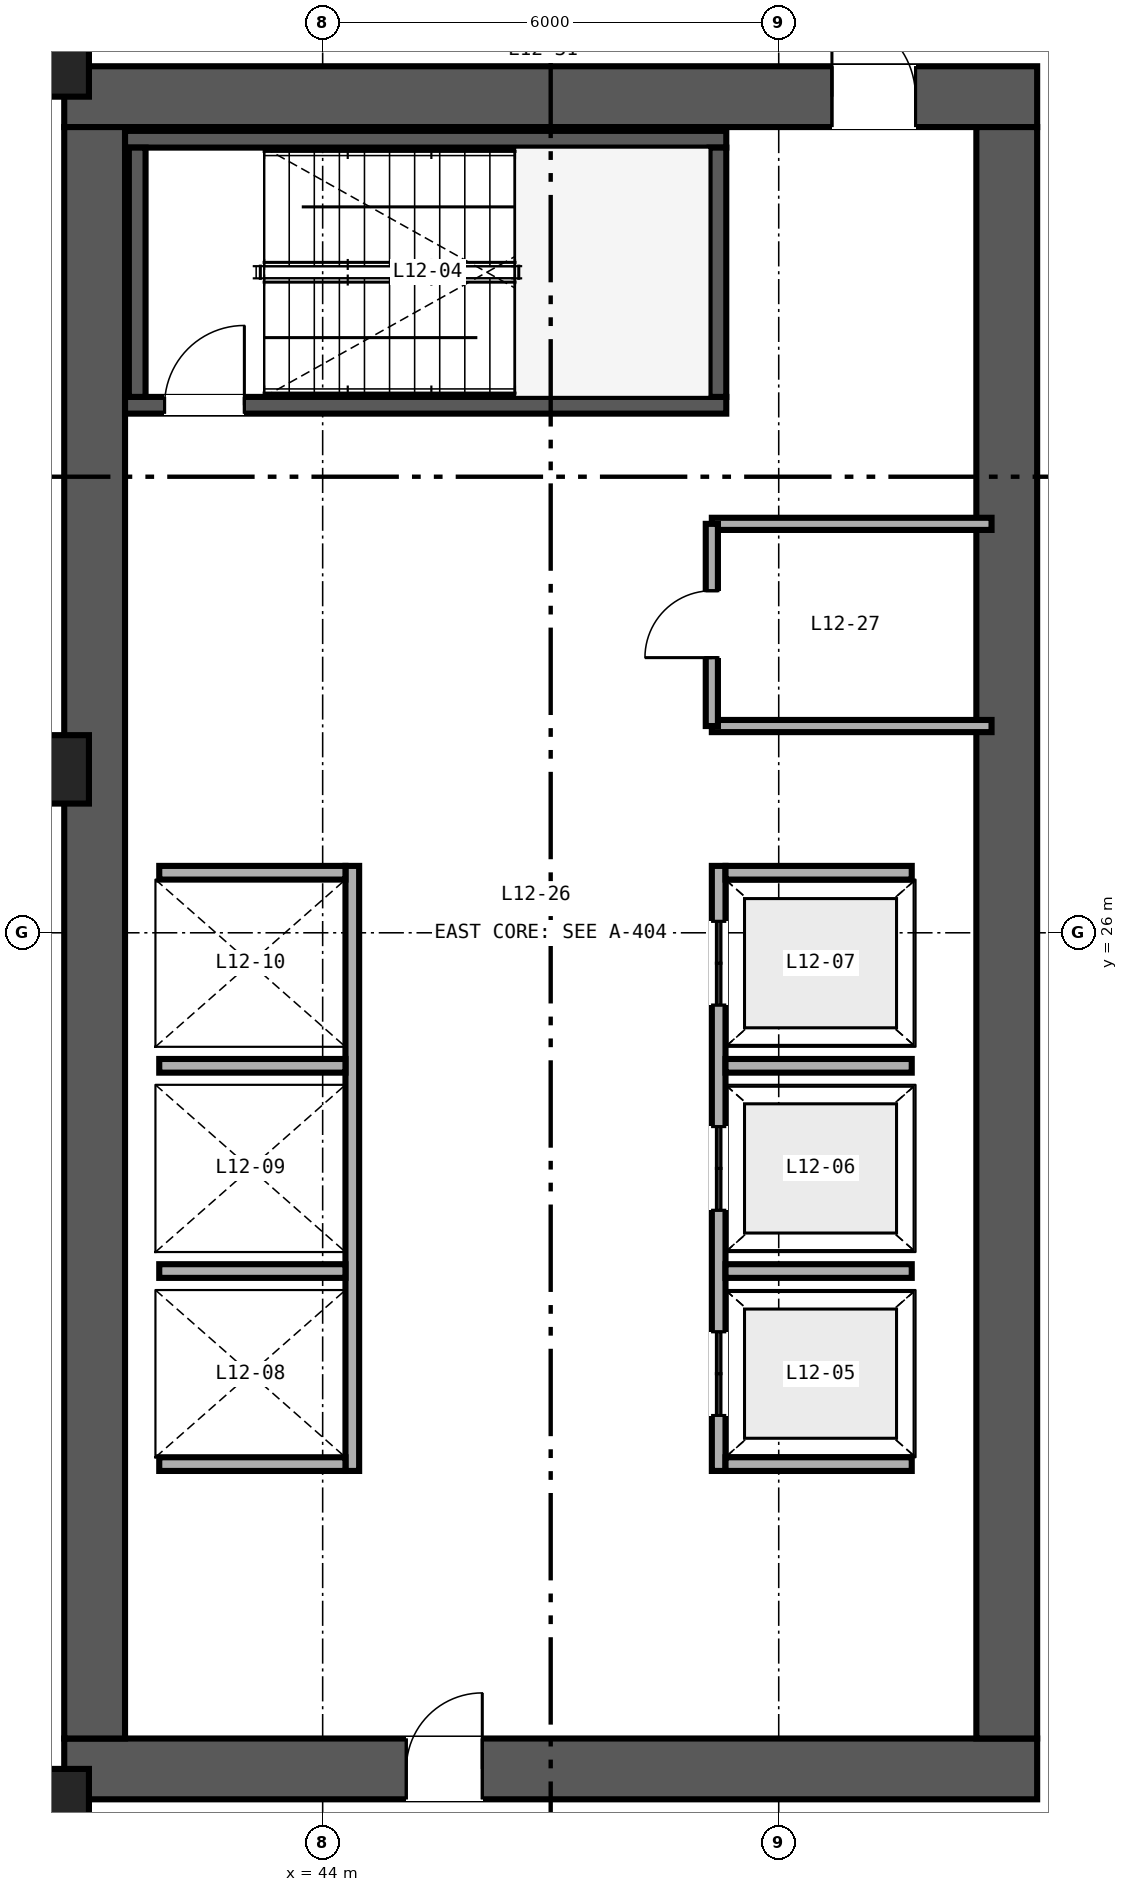
"""IFC4 building model, lengths in metres.
Left out: names, types, materials, properties, quantities, classifications, styles, units other than length and angle.
Written with IfcOpenShell. Run it as: python <this file> out.ifc"""

import sys

from ifc_helpers import new_model, si_unit, direction, frame, frame_2d, origin, origin_2d, place, context, subcontext, project, spatial, rectangle, hollow_rectangle, extrude, source, transform, mapped, element, fill, save


model = new_model("IFC4")
c1 = context("Model", 3, precision=1e-05, world=origin(), true_north=direction((0.0, 1.0)))
c2 = subcontext(c1, "Body", "Model", "MODEL_VIEW")
j1 = project(units=[si_unit("LENGTHUNIT", "METRE"), si_unit("PLANEANGLEUNIT", "RADIAN")], contexts=[c1])
p1 = place(None, origin())
s1 = spatial("IfcSite", under=j1, at=p1, CompositionType="ELEMENT")
p2 = place(p1, origin())
s2 = spatial("IfcBuilding", under=s1, at=p2, CompositionType="ELEMENT")
p3 = place(p2, frame((0.0, 0.0, 52.8)))
s3 = spatial("IfcBuildingStorey", under=s2, at=p3, CompositionType="ELEMENT", Elevation=52.8)
p4 = place(p3, frame((40.6, 15.0, 0.0), z_axis=(0.0, 0.0, 1.0), x_axis=(1.0, 0.0, 0.0)))
e1 = element("IfcWall", 1, at=p4, inside=s3, PredefinedType="SHEAR", context=c2, shape_type="SweptSolid", body=[
    extrude(rectangle(XDim=12.8, YDim=0.8, at=frame_2d((6.4, 0.0))), origin(), (0.0, 0.0, 1.0), 3.35),
])
p5 = place(p4, frame((4.5, 0.0, 0.0)))
e2 = element("IfcOpeningElement", 2, at=p5, cuts=e1, PredefinedType="OPENING", context=c2, shape_type="SweptSolid", body=[
    extrude(rectangle(XDim=1.0, YDim=2.15, at=frame_2d((0.5, 1.075))), frame((0.0, 0.41, 0.0), z_axis=(0.0, -1.0, 0.0), x_axis=(1.0, 0.0, 0.0)), (0.0, 0.0, 1.0), 0.82),
])
p6 = place(p3, frame((40.6, 37.0, 0.0), z_axis=(0.0, 0.0, 1.0), x_axis=(1.0, 0.0, 0.0)))
e3 = element("IfcWall", 3, at=p6, inside=s3, PredefinedType="SHEAR", context=c2, shape_type="SweptSolid", body=[
    extrude(rectangle(XDim=12.8, YDim=0.8, at=frame_2d((6.4, 0.0))), origin(), (0.0, 0.0, 1.0), 3.35),
])
p7 = place(p6, frame((10.1, 0.0, 0.0)))
e4 = element("IfcOpeningElement", 4, at=p7, cuts=e3, PredefinedType="OPENING", context=c2, shape_type="SweptSolid", body=[
    extrude(rectangle(XDim=1.1, YDim=2.15, at=frame_2d((0.55, 1.075))), frame((0.0, 0.41, 0.0), z_axis=(0.0, -1.0, 0.0), x_axis=(1.0, 0.0, 0.0)), (0.0, 0.0, 1.0), 0.82),
])
for number, where, z_axis, x_axis in (
    (5, (41.0, 15.4, 0.0), (0.0, 0.0, 1.0), (0.0, 1.0, 0.0)),
    (6, (53.0, 15.4, 0.0), (0.0, 0.0, 1.0), (0.0, 1.0, 0.0)),
):
    element("IfcWall", number, at=place(p3, frame(where, z_axis=z_axis, x_axis=x_axis)), inside=s3, PredefinedType="SHEAR", context=c2, shape_type="SweptSolid", body=[
        extrude(rectangle(XDim=21.2, YDim=0.8, at=frame_2d((10.6, 0.0))), origin(), (0.0, 0.0, 1.0), 3.35),
    ])
p8 = place(p3, frame((41.4, 32.94, 0.0), z_axis=(0.0, 0.0, 1.0), x_axis=(1.0, 0.0, 0.0)))
e7 = element("IfcWall", 7, at=p8, inside=s3, PredefinedType="SHEAR", context=c2, shape_type="SweptSolid", body=[
    extrude(rectangle(XDim=7.91, YDim=0.22, at=frame_2d((3.955, 0.0))), origin(), (0.0, 0.0, 1.0), 3.4),
])
p9 = place(p8, frame((0.52, 0.0, 0.0)))
e8 = element("IfcOpeningElement", 8, at=p9, cuts=e7, PredefinedType="OPENING", context=c2, shape_type="SweptSolid", body=[
    extrude(rectangle(XDim=1.05, YDim=2.15, at=frame_2d((0.525, 1.075))), frame((0.0, 0.12, 0.0), z_axis=(0.0, -1.0, 0.0), x_axis=(1.0, 0.0, 0.0)), (0.0, 0.0, 1.0), 0.24),
])
p10 = place(p3, frame((41.4, 36.44, 0.0), z_axis=(0.0, 0.0, 1.0), x_axis=(1.0, 0.0, 0.0)))
e9 = element("IfcWall", 9, at=p10, inside=s3, PredefinedType="SHEAR", context=c2, shape_type="SweptSolid", body=[
    extrude(rectangle(XDim=7.91, YDim=0.22, at=frame_2d((3.955, 0.0))), origin(), (0.0, 0.0, 1.0), 3.4),
])
for number, where, z_axis, x_axis in (
    (10, (41.56, 33.05, 0.0), (0.0, 0.0, 1.0), (0.0, 1.0, 0.0)),
    (11, (49.2, 33.05, 0.0), (0.0, 0.0, 1.0), (0.0, 1.0, 0.0)),
):
    element("IfcWall", number, at=place(p3, frame(where, z_axis=z_axis, x_axis=x_axis)), inside=s3, PredefinedType="SHEAR", context=c2, shape_type="SweptSolid", body=[
        extrude(rectangle(XDim=3.28, YDim=0.22, at=frame_2d((1.64, 0.0))), origin(), (0.0, 0.0, 1.0), 3.4),
    ])
m1 = source(origin(), c2, "Body", "SweptSolid", [
    extrude(hollow_rectangle(XDim=0.85, YDim=0.9, WallThickness=0.04, at=origin_2d()), origin(), (0.0, 0.0, 1.0), 3.35),
])
for number, where, z_axis, x_axis in (
    (12, (40.5, 14.55, 0.0), (0.0, 0.0, 1.0), (1.0, 0.0, 0.0)),
    (13, (40.5, 28.15, 0.0), (0.0, 0.0, 1.0), (1.0, 0.0, 0.0)),
    (14, (40.5, 37.45, 0.0), (0.0, 0.0, 1.0), (1.0, 0.0, 0.0)),
):
    element("IfcColumn", number, at=place(p3, frame(where, z_axis=z_axis, x_axis=x_axis)), inside=s3, PredefinedType="COLUMN", context=c2, shape_type="MappedRepresentation", body=[
        mapped(m1, transform((0.0, 0.0, 0.0), scale=1.0)),
    ])
p11 = place(p3, frame((49.21, 18.92, 0.0), z_axis=(0.0, 0.0, 1.0), x_axis=(0.0, 1.0, 0.0)))
e15 = element("IfcWall", 15, at=p11, inside=s3, PredefinedType="SOLIDWALL", context=c2, shape_type="SweptSolid", body=[
    extrude(rectangle(XDim=7.96, YDim=0.18, at=frame_2d((3.98, 0.0))), origin(), (0.0, 0.0, 1.0), 3.35),
])
p12 = place(p11, frame((0.73, 0.0, 0.0)))
e16 = element("IfcOpeningElement", 16, at=p12, cuts=e15, PredefinedType="OPENING", context=c2, shape_type="SweptSolid", body=[
    extrude(rectangle(XDim=1.1, YDim=2.2, at=frame_2d((0.55, 1.1))), frame((0.0, 0.1, 0.0), z_axis=(0.0, -1.0, 0.0), x_axis=(1.0, 0.0, 0.0)), (0.0, 0.0, 1.0), 0.2),
])
p13 = place(p11, frame((3.43, 0.0, 0.0)))
e17 = element("IfcOpeningElement", 17, at=p13, cuts=e15, PredefinedType="OPENING", context=c2, shape_type="SweptSolid", body=[
    extrude(rectangle(XDim=1.1, YDim=2.2, at=frame_2d((0.55, 1.1))), frame((0.0, 0.1, 0.0), z_axis=(0.0, -1.0, 0.0), x_axis=(1.0, 0.0, 0.0)), (0.0, 0.0, 1.0), 0.2),
])
p14 = place(p11, frame((6.13, 0.0, 0.0)))
e18 = element("IfcOpeningElement", 18, at=p14, cuts=e15, PredefinedType="OPENING", context=c2, shape_type="SweptSolid", body=[
    extrude(rectangle(XDim=1.1, YDim=2.2, at=frame_2d((0.55, 1.1))), frame((0.0, 0.1, 0.0), z_axis=(0.0, -1.0, 0.0), x_axis=(1.0, 0.0, 0.0)), (0.0, 0.0, 1.0), 0.2),
])
for number, where, z_axis, x_axis in (
    (19, (49.3, 19.01, 0.0), (0.0, 0.0, 1.0), (1.0, 0.0, 0.0)),
    (20, (49.3, 26.79, 0.0), (0.0, 0.0, 1.0), (1.0, 0.0, 0.0)),
    (21, (49.3, 21.55, 0.0), (0.0, 0.0, 1.0), (1.0, 0.0, 0.0)),
    (22, (49.3, 24.25, 0.0), (0.0, 0.0, 1.0), (1.0, 0.0, 0.0)),
):
    element("IfcWall", number, at=place(p3, frame(where, z_axis=z_axis, x_axis=x_axis)), inside=s3, PredefinedType="SOLIDWALL", context=c2, shape_type="SweptSolid", body=[
        extrude(rectangle(XDim=2.45, YDim=0.18, at=frame_2d((1.225, 0.0))), origin(), (0.0, 0.0, 1.0), 3.35),
    ])
p15 = place(p3, frame((44.39, 18.92, 0.0), z_axis=(0.0, 0.0, 1.0), x_axis=(0.0, 1.0, 0.0)))
e23 = element("IfcWall", 23, at=p15, inside=s3, PredefinedType="SOLIDWALL", context=c2, shape_type="SweptSolid", body=[
    extrude(rectangle(XDim=7.96, YDim=0.18, at=frame_2d((3.98, 0.0))), origin(), (0.0, 0.0, 1.0), 3.35),
])
for number, where, z_axis, x_axis in (
    (24, (41.85, 19.01, 0.0), (0.0, 0.0, 1.0), (1.0, 0.0, 0.0)),
    (25, (41.85, 26.79, 0.0), (0.0, 0.0, 1.0), (1.0, 0.0, 0.0)),
    (26, (41.85, 21.55, 0.0), (0.0, 0.0, 1.0), (1.0, 0.0, 0.0)),
    (27, (41.85, 24.25, 0.0), (0.0, 0.0, 1.0), (1.0, 0.0, 0.0)),
):
    element("IfcWall", number, at=place(p3, frame(where, z_axis=z_axis, x_axis=x_axis)), inside=s3, PredefinedType="SOLIDWALL", context=c2, shape_type="SweptSolid", body=[
        extrude(rectangle(XDim=2.45, YDim=0.18, at=frame_2d((1.225, 0.0))), origin(), (0.0, 0.0, 1.0), 3.35),
    ])
p16 = place(p3, frame((49.12, 28.72, 0.0), z_axis=(0.0, 0.0, 1.0), x_axis=(1.0, 0.0, 0.0)))
e28 = element("IfcWall", 28, at=p16, inside=s3, PredefinedType="PARTITIONING", context=c2, shape_type="SweptSolid", body=[
    extrude(rectangle(XDim=3.68, YDim=0.16, at=frame_2d((1.84, 0.0))), origin(), (0.0, 0.0, 1.0), 3.35),
])
p17 = place(p3, frame((49.12, 31.38, 0.0), z_axis=(0.0, 0.0, 1.0), x_axis=(1.0, 0.0, 0.0)))
e29 = element("IfcWall", 29, at=p17, inside=s3, PredefinedType="PARTITIONING", context=c2, shape_type="SweptSolid", body=[
    extrude(rectangle(XDim=3.68, YDim=0.16, at=frame_2d((1.84, 0.0))), origin(), (0.0, 0.0, 1.0), 2.36),
])
p18 = place(p3, frame((49.12, 28.72, 0.0), z_axis=(0.0, 0.0, 1.0), x_axis=(0.0, 1.0, 0.0)))
e30 = element("IfcWall", 30, at=p18, inside=s3, PredefinedType="PARTITIONING", context=c2, shape_type="SweptSolid", body=[
    extrude(rectangle(XDim=2.66, YDim=0.16, at=frame_2d((1.33, 0.0))), origin(), (0.0, 0.0, 1.0), 2.36),
])
p19 = place(p18, frame((0.9, 0.0, 0.0)))
e31 = element("IfcOpeningElement", 31, at=p19, cuts=e30, PredefinedType="OPENING", context=c2, shape_type="SweptSolid", body=[
    extrude(rectangle(XDim=0.88, YDim=2.15, at=frame_2d((0.44, 1.075))), frame((0.0, 0.09, 0.0), z_axis=(0.0, -1.0, 0.0), x_axis=(1.0, 0.0, 0.0)), (0.0, 0.0, 1.0), 0.18),
])
m2 = source(origin(), c2, "Body", "SweptSolid", [
    extrude(rectangle(XDim=1.05, YDim=2.15, at=frame_2d((0.525, 1.075))), frame((0.0, 0.025, 0.0), z_axis=(0.0, -1.0, 0.0), x_axis=(1.0, 0.0, 0.0)), (0.0, 0.0, 1.0), 0.05),
])
p20 = place(p9, origin())
e32 = element("IfcDoor", 32, at=p20, inside=s3, OperationType="SINGLE_SWING_RIGHT", PredefinedType="DOOR", context=c2, shape_type="MappedRepresentation", body=[
    mapped(m2, transform((0.0, 0.0, 0.0), scale=1.0)),
])
fill(e8, e32)
m3 = source(origin(), c2, "Body", "SweptSolid", [
    extrude(rectangle(XDim=1.1, YDim=2.2, at=frame_2d((0.55, 1.1))), frame((0.0, 0.025, 0.0), z_axis=(0.0, -1.0, 0.0), x_axis=(1.0, 0.0, 0.0)), (0.0, 0.0, 1.0), 0.05),
])
p21 = place(p12, origin())
e33 = element("IfcDoor", 33, at=p21, inside=s3, OperationType="DOUBLE_DOOR_SLIDING", PredefinedType="DOOR", context=c2, shape_type="MappedRepresentation", body=[
    mapped(m3, transform((0.0, 0.0, 0.0), scale=1.0)),
])
fill(e16, e33)
p22 = place(p13, origin())
e34 = element("IfcDoor", 34, at=p22, inside=s3, OperationType="DOUBLE_DOOR_SLIDING", PredefinedType="DOOR", context=c2, shape_type="MappedRepresentation", body=[
    mapped(m3, transform((0.0, 0.0, 0.0), scale=1.0)),
])
fill(e17, e34)
p23 = place(p14, origin())
e35 = element("IfcDoor", 35, at=p23, inside=s3, OperationType="DOUBLE_DOOR_SLIDING", PredefinedType="DOOR", context=c2, shape_type="MappedRepresentation", body=[
    mapped(m3, transform((0.0, 0.0, 0.0), scale=1.0)),
])
fill(e18, e35)
m4 = source(origin(), c2, "Body", "SweptSolid", [
    extrude(rectangle(XDim=1.0, YDim=2.15, at=frame_2d((0.5, 1.075))), frame((0.0, 0.025, 0.0), z_axis=(0.0, -1.0, 0.0), x_axis=(1.0, 0.0, 0.0)), (0.0, 0.0, 1.0), 0.05),
])
p24 = place(p5, origin())
e36 = element("IfcDoor", 36, at=p24, inside=s3, OperationType="SINGLE_SWING_RIGHT", PredefinedType="DOOR", context=c2, shape_type="MappedRepresentation", body=[
    mapped(m4, transform((0.0, 0.0, 0.0), scale=1.0)),
])
fill(e2, e36)
m5 = source(origin(), c2, "Body", "SweptSolid", [
    extrude(rectangle(XDim=1.1, YDim=2.15, at=frame_2d((0.55, 1.075))), frame((0.0, 0.025, 0.0), z_axis=(0.0, -1.0, 0.0), x_axis=(1.0, 0.0, 0.0)), (0.0, 0.0, 1.0), 0.05),
])
p25 = place(p7, origin())
e37 = element("IfcDoor", 37, at=p25, inside=s3, OperationType="SINGLE_SWING_LEFT", PredefinedType="DOOR", context=c2, shape_type="MappedRepresentation", body=[
    mapped(m5, transform((0.0, 0.0, 0.0), scale=1.0)),
])
fill(e4, e37)
m6 = source(origin(), c2, "Body", "SweptSolid", [
    extrude(rectangle(XDim=0.88, YDim=2.15, at=frame_2d((0.44, 1.075))), frame((0.0, 0.025, 0.0), z_axis=(0.0, -1.0, 0.0), x_axis=(1.0, 0.0, 0.0)), (0.0, 0.0, 1.0), 0.05),
])
p26 = place(p19, origin())
e38 = element("IfcDoor", 38, at=p26, inside=s3, OperationType="SINGLE_SWING_LEFT", PredefinedType="DOOR", context=c2, shape_type="MappedRepresentation", body=[
    mapped(m6, transform((0.0, 0.0, 0.0), scale=1.0)),
])
fill(e31, e38)
save(model, sys.argv[1])
